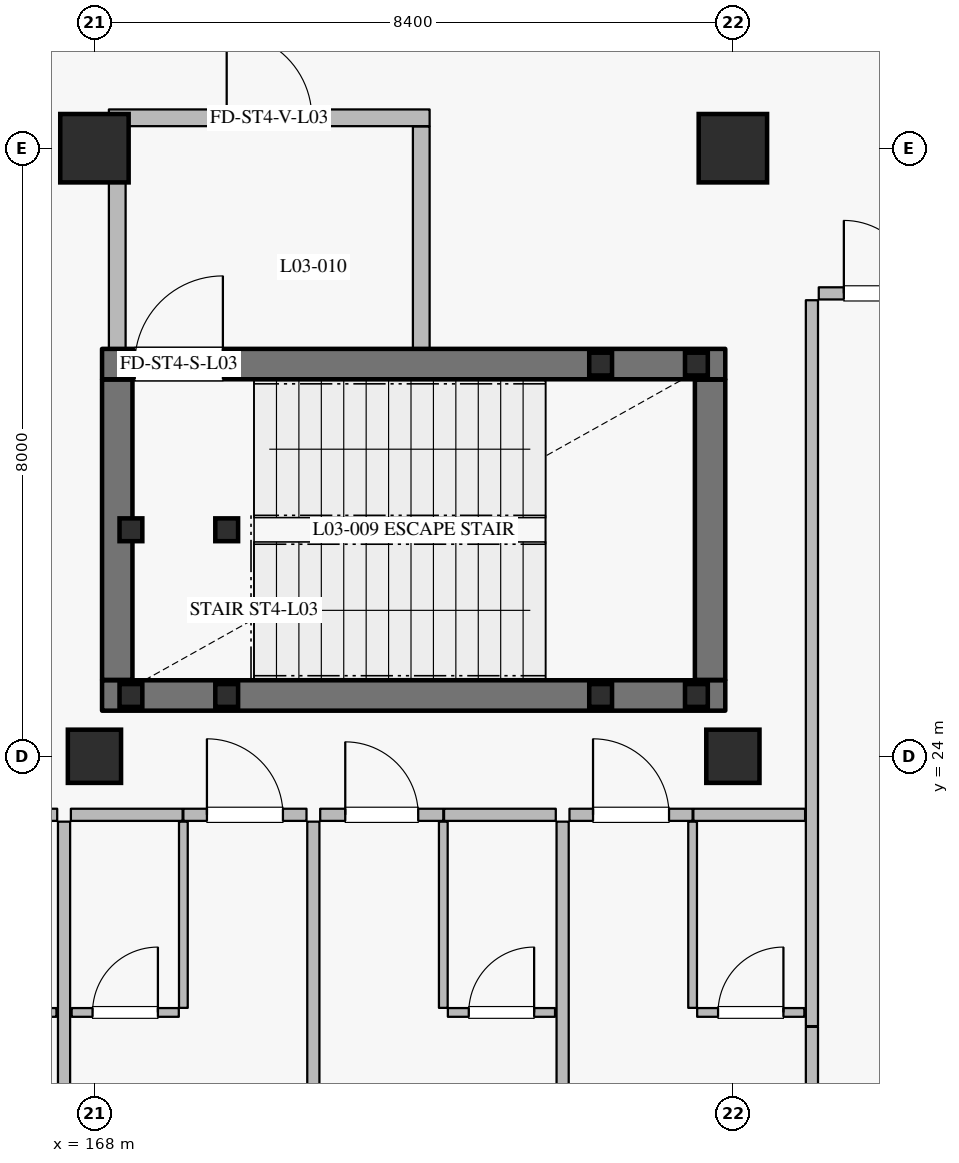
"""IFC4 building model, lengths in metres.
Left out: names, types, materials, properties, quantities, classifications, styles, units other than length and angle.
Written with IfcOpenShell. Run it as: python <this file> out.ifc"""

import sys

from ifc_helpers import new_model, si_unit, direction, frame, frame_2d, origin, origin_2d, place, context, subcontext, project, spatial, rectangle, hollow_rectangle, extrude, element, fill, save


model = new_model("IFC4")
c1 = context("Model", 3, precision=1e-05, world=origin(), true_north=direction((0.0, 1.0)))
c2 = subcontext(c1, "Body", "Model", "MODEL_VIEW")
j1 = project(units=[si_unit("LENGTHUNIT", "METRE"), si_unit("PLANEANGLEUNIT", "RADIAN")], contexts=[c1])
p1 = place(None, origin())
s1 = spatial("IfcSite", under=j1, at=p1, CompositionType="ELEMENT")
p2 = place(p1, origin())
s2 = spatial("IfcBuilding", under=s1, at=p2, CompositionType="ELEMENT")
p3 = place(p2, frame((0.0, 0.0, 16.2)))
s3 = spatial("IfcBuildingStorey", under=s2, at=p3, CompositionType="ELEMENT", Elevation=16.2)
for number, where, z_axis, x_axis in (
    (1, (168.0, 32.0, 0.0), (0.0, 0.0, 1.0), (1.0, 0.0, 0.0)),
    (2, (176.4, 32.0, 0.0), (0.0, 0.0, 1.0), (1.0, 0.0, 0.0)),
):
    element("IfcColumn", number, at=place(p3, frame(where, z_axis=z_axis, x_axis=x_axis)), inside=s3, PredefinedType="COLUMN", context=c2, shape_type="SweptSolid", body=[
        extrude(rectangle(XDim=0.9, YDim=0.9, at=origin_2d()), origin(), (0.0, 0.0, 1.0), 4.8),
    ])
for number, where, z_axis, x_axis in (
    (3, (168.0, 24.0, 0.0), (0.0, 0.0, 1.0), (1.0, 0.0, 0.0)),
    (4, (176.4, 24.0, 0.0), (0.0, 0.0, 1.0), (1.0, 0.0, 0.0)),
):
    element("IfcColumn", number, at=place(p3, frame(where, z_axis=z_axis, x_axis=x_axis)), inside=s3, PredefinedType="COLUMN", context=c2, shape_type="SweptSolid", body=[
        extrude(rectangle(XDim=0.7, YDim=0.7, at=origin_2d()), origin(), (0.0, 0.0, 1.0), 4.8),
    ])
p4 = place(p3, frame((184.4, 23.619, 0.0), z_axis=(0.0, 0.0, 1.0), x_axis=(-0.724145676014, -0.689647040094, 0.0)))
e5 = element("IfcWall", 5, at=p4, inside=s3, PredefinedType="SOLIDWALL", context=c2, shape_type="SweptSolid", body=[
    extrude(rectangle(XDim=10.495, YDim=0.24, at=frame_2d((5.248, 0.0))), origin(), (0.0, 0.0, 1.0), 4.13),
])
p5 = place(p4, frame((1.817, 0.0, 0.8)))
e6 = element("IfcOpeningElement", 6, at=p5, cuts=e5, PredefinedType="OPENING", context=c2, shape_type="SweptSolid", body=[
    extrude(rectangle(XDim=2.0, YDim=1.75, at=frame_2d((1.0, 0.875))), frame((0.0, 0.13, 0.0), z_axis=(0.0, -1.0, 0.0), x_axis=(1.0, 0.0, 0.0)), (0.0, 0.0, 1.0), 0.26),
])
p6 = place(p4, frame((6.347, 0.0, 0.8)))
e7 = element("IfcOpeningElement", 7, at=p6, cuts=e5, PredefinedType="OPENING", context=c2, shape_type="SweptSolid", body=[
    extrude(rectangle(XDim=2.0, YDim=1.75, at=frame_2d((1.0, 0.875))), frame((0.0, 0.13, 0.0), z_axis=(0.0, -1.0, 0.0), x_axis=(1.0, 0.0, 0.0)), (0.0, 0.0, 1.0), 0.26),
])
p7 = place(p3, frame((168.1, 24.8, 0.0), z_axis=(0.0, 0.0, 1.0), x_axis=(1.0, 0.0, 0.0)))
e8 = element("IfcWall", 8, at=p7, inside=s3, PredefinedType="SHEAR", context=c2, shape_type="SweptSolid", body=[
    extrude(rectangle(XDim=8.2, YDim=0.4, at=frame_2d((4.1, 0.0))), origin(), (0.0, 0.0, 1.0), 4.535),
])
p8 = place(p3, frame((176.1, 25.005, 0.0), z_axis=(0.0, 0.0, 1.0), x_axis=(0.0, 1.0, 0.0)))
e9 = element("IfcWall", 9, at=p8, inside=s3, PredefinedType="SHEAR", context=c2, shape_type="SweptSolid", body=[
    extrude(rectangle(XDim=3.95, YDim=0.4, at=frame_2d((1.975, 0.0))), origin(), (0.0, 0.0, 1.0), 4.535),
])
p9 = place(p3, frame((168.1, 29.16, 0.0), z_axis=(0.0, 0.0, 1.0), x_axis=(1.0, 0.0, 0.0)))
e10 = element("IfcWall", 10, at=p9, inside=s3, PredefinedType="SHEAR", context=c2, shape_type="SweptSolid", body=[
    extrude(rectangle(XDim=8.2, YDim=0.4, at=frame_2d((4.1, 0.0))), origin(), (0.0, 0.0, 1.0), 4.535),
])
p10 = place(p9, frame((0.43, 0.0, 0.0)))
e11 = element("IfcOpeningElement", 11, at=p10, cuts=e10, PredefinedType="OPENING", context=c2, shape_type="SweptSolid", body=[
    extrude(rectangle(XDim=1.16, YDim=2.2, at=frame_2d((0.58, 1.1))), frame((0.0, 0.21, 0.0), z_axis=(0.0, -1.0, 0.0), x_axis=(1.0, 0.0, 0.0)), (0.0, 0.0, 1.0), 0.42),
])
p11 = place(p3, frame((168.3, 25.005, 0.0), z_axis=(0.0, 0.0, 1.0), x_axis=(0.0, 1.0, 0.0)))
e12 = element("IfcWall", 12, at=p11, inside=s3, PredefinedType="SHEAR", context=c2, shape_type="SweptSolid", body=[
    extrude(rectangle(XDim=3.95, YDim=0.4, at=frame_2d((1.975, 0.0))), origin(), (0.0, 0.0, 1.0), 4.535),
])
p12 = place(p3, frame((168.3, 29.365, 0.0), z_axis=(0.0, 0.0, 1.0), x_axis=(0.0, 1.0, 0.0)))
e13 = element("IfcWall", 13, at=p12, inside=s3, PredefinedType="PARTITIONING", context=c2, shape_type="SweptSolid", body=[
    extrude(rectangle(XDim=2.92, YDim=0.22, at=frame_2d((1.46, 0.0))), origin(), (0.0, 0.0, 1.0), 4.535),
])
p13 = place(p3, frame((168.19, 32.4, 0.0), z_axis=(0.0, 0.0, 1.0), x_axis=(1.0, 0.0, 0.0)))
e14 = element("IfcWall", 14, at=p13, inside=s3, PredefinedType="PARTITIONING", context=c2, shape_type="SweptSolid", body=[
    extrude(rectangle(XDim=4.22, YDim=0.22, at=frame_2d((2.11, 0.0))), origin(), (0.0, 0.0, 1.0), 4.535),
])
p14 = place(p13, frame((1.55, 0.0, 0.0)))
e15 = element("IfcOpeningElement", 15, at=p14, cuts=e14, PredefinedType="OPENING", context=c2, shape_type="SweptSolid", body=[
    extrude(rectangle(XDim=1.12, YDim=2.2, at=frame_2d((0.56, 1.1))), frame((0.0, 0.12, 0.0), z_axis=(0.0, -1.0, 0.0), x_axis=(1.0, 0.0, 0.0)), (0.0, 0.0, 1.0), 0.24),
])
p15 = place(p3, frame((172.3, 29.365, 0.0), z_axis=(0.0, 0.0, 1.0), x_axis=(0.0, 1.0, 0.0)))
e16 = element("IfcWall", 16, at=p15, inside=s3, PredefinedType="PARTITIONING", context=c2, shape_type="SweptSolid", body=[
    extrude(rectangle(XDim=2.92, YDim=0.22, at=frame_2d((1.46, 0.0))), origin(), (0.0, 0.0, 1.0), 4.535),
])
for number, where, z_axis, x_axis in (
    (17, (168.48, 24.8, 0.0), (0.0, 0.0, 1.0), (1.0, 0.0, 0.0)),
    (18, (168.48, 26.98, 0.0), (0.0, 0.0, 1.0), (1.0, 0.0, 0.0)),
    (19, (169.74, 24.8, 0.0), (0.0, 0.0, 1.0), (1.0, 0.0, 0.0)),
    (20, (169.74, 26.98, 0.0), (0.0, 0.0, 1.0), (1.0, 0.0, 0.0)),
):
    element("IfcColumn", number, at=place(p3, frame(where, z_axis=z_axis, x_axis=x_axis)), inside=s3, PredefinedType="COLUMN", context=c2, shape_type="SweptSolid", body=[
        extrude(hollow_rectangle(XDim=0.3, YDim=0.3, WallThickness=0.012, at=origin_2d()), origin(), (0.0, 0.0, 1.0), 4.62),
    ])
for number, where, z_axis, x_axis in (
    (21, (174.66, 24.8, -2.4), (0.0, 0.0, 1.0), (1.0, 0.0, 0.0)),
    (22, (174.66, 29.16, -2.4), (0.0, 0.0, 1.0), (1.0, 0.0, 0.0)),
    (23, (175.92, 24.8, -2.4), (0.0, 0.0, 1.0), (1.0, 0.0, 0.0)),
    (24, (175.92, 29.16, -2.4), (0.0, 0.0, 1.0), (1.0, 0.0, 0.0)),
):
    element("IfcColumn", number, at=place(p3, frame(where, z_axis=z_axis, x_axis=x_axis)), inside=s3, PredefinedType="COLUMN", context=c2, shape_type="SweptSolid", body=[
        extrude(hollow_rectangle(XDim=0.3, YDim=0.3, WallThickness=0.012, at=origin_2d()), origin(), (0.0, 0.0, 1.0), 4.62),
    ])
p16 = place(p3, frame((166.04, 23.23, 0.0), z_axis=(0.0, 0.0, 1.0), x_axis=(1.0, 0.0, 0.0)))
e25 = element("IfcWall", 25, at=p16, inside=s3, PredefinedType="PARTITIONING", context=c2, shape_type="SweptSolid", body=[
    extrude(rectangle(XDim=1.47, YDim=0.16, at=frame_2d((0.735, 0.0))), origin(), (0.0, 0.0, 1.0), 4.535),
])
p17 = place(p3, frame((166.09, 20.63, 0.0), z_axis=(0.0, 0.0, 1.0), x_axis=(1.0, 0.0, 0.0)))
e26 = element("IfcWall", 26, at=p17, inside=s3, PredefinedType="PARTITIONING", context=c2, shape_type="SweptSolid", body=[
    extrude(rectangle(XDim=1.41, YDim=0.115, at=frame_2d((0.705, 0.0))), origin(), (0.0, 0.0, 1.0), 4.535),
])
p18 = place(p17, frame((0.275, 0.0, 0.0)))
e27 = element("IfcOpeningElement", 27, at=p18, cuts=e26, PredefinedType="OPENING", context=c2, shape_type="SweptSolid", body=[
    extrude(rectangle(XDim=0.86, YDim=2.12, at=frame_2d((0.43, 1.06))), frame((0.0, 0.067, 0.0), z_axis=(0.0, -1.0, 0.0), x_axis=(1.0, 0.0, 0.0)), (0.0, 0.0, 1.0), 0.135),
])
p19 = place(p3, frame((167.69, 23.23, 0.0), z_axis=(0.0, 0.0, 1.0), x_axis=(1.0, 0.0, 0.0)))
e28 = element("IfcWall", 28, at=p19, inside=s3, PredefinedType="PARTITIONING", context=c2, shape_type="SweptSolid", body=[
    extrude(rectangle(XDim=1.47, YDim=0.16, at=frame_2d((0.735, 0.0))), origin(), (0.0, 0.0, 1.0), 4.535),
])
p20 = place(p3, frame((169.17, 23.23, 0.0), z_axis=(0.0, 0.0, 1.0), x_axis=(1.0, 0.0, 0.0)))
e29 = element("IfcWall", 29, at=p20, inside=s3, PredefinedType="PARTITIONING", context=c2, shape_type="SweptSolid", body=[
    extrude(rectangle(XDim=1.62, YDim=0.16, at=frame_2d((0.81, 0.0))), origin(), (0.0, 0.0, 1.0), 4.535),
])
p21 = place(p20, frame((0.31, 0.0, 0.0)))
e30 = element("IfcOpeningElement", 30, at=p21, cuts=e29, PredefinedType="OPENING", context=c2, shape_type="SweptSolid", body=[
    extrude(rectangle(XDim=1.0, YDim=2.25, at=frame_2d((0.5, 1.125))), frame((0.0, 0.09, 0.0), z_axis=(0.0, -1.0, 0.0), x_axis=(1.0, 0.0, 0.0)), (0.0, 0.0, 1.0), 0.18),
])
p22 = place(p3, frame((169.17, 20.69, 0.0), z_axis=(0.0, 0.0, 1.0), x_axis=(0.0, 1.0, 0.0)))
e31 = element("IfcWall", 31, at=p22, inside=s3, PredefinedType="PARTITIONING", context=c2, shape_type="SweptSolid", body=[
    extrude(rectangle(XDim=2.45, YDim=0.115, at=frame_2d((1.225, 0.0))), origin(), (0.0, 0.0, 1.0), 4.535),
])
p23 = place(p3, frame((167.7, 20.63, 0.0), z_axis=(0.0, 0.0, 1.0), x_axis=(1.0, 0.0, 0.0)))
e32 = element("IfcWall", 32, at=p23, inside=s3, PredefinedType="PARTITIONING", context=c2, shape_type="SweptSolid", body=[
    extrude(rectangle(XDim=1.41, YDim=0.115, at=frame_2d((0.705, 0.0))), origin(), (0.0, 0.0, 1.0), 4.535),
])
p24 = place(p23, frame((0.275, 0.0, 0.0)))
e33 = element("IfcOpeningElement", 33, at=p24, cuts=e32, PredefinedType="OPENING", context=c2, shape_type="SweptSolid", body=[
    extrude(rectangle(XDim=0.86, YDim=2.12, at=frame_2d((0.43, 1.06))), frame((0.0, 0.067, 0.0), z_axis=(0.0, -1.0, 0.0), x_axis=(1.0, 0.0, 0.0)), (0.0, 0.0, 1.0), 0.135),
])
p25 = place(p3, frame((167.6, 16.34, 0.0), z_axis=(0.0, 0.0, 1.0), x_axis=(0.0, 1.0, 0.0)))
e34 = element("IfcWall", 34, at=p25, inside=s3, PredefinedType="PARTITIONING", context=c2, shape_type="SweptSolid", body=[
    extrude(rectangle(XDim=6.8, YDim=0.16, at=frame_2d((3.4, 0.0))), origin(), (0.0, 0.0, 1.0), 4.535),
])
p26 = place(p3, frame((170.97, 23.23, 0.0), z_axis=(0.0, 0.0, 1.0), x_axis=(1.0, 0.0, 0.0)))
e35 = element("IfcWall", 35, at=p26, inside=s3, PredefinedType="PARTITIONING", context=c2, shape_type="SweptSolid", body=[
    extrude(rectangle(XDim=1.62, YDim=0.16, at=frame_2d((0.81, 0.0))), origin(), (0.0, 0.0, 1.0), 4.535),
])
p27 = place(p26, frame((0.33, 0.0, 0.0)))
e36 = element("IfcOpeningElement", 36, at=p27, cuts=e35, PredefinedType="OPENING", context=c2, shape_type="SweptSolid", body=[
    extrude(rectangle(XDim=0.96, YDim=2.2, at=frame_2d((0.48, 1.1))), frame((0.0, 0.09, 0.0), z_axis=(0.0, -1.0, 0.0), x_axis=(1.0, 0.0, 0.0)), (0.0, 0.0, 1.0), 0.18),
])
p28 = place(p3, frame((172.6, 23.23, 0.0), z_axis=(0.0, 0.0, 1.0), x_axis=(1.0, 0.0, 0.0)))
e37 = element("IfcWall", 37, at=p28, inside=s3, PredefinedType="PARTITIONING", context=c2, shape_type="SweptSolid", body=[
    extrude(rectangle(XDim=1.47, YDim=0.16, at=frame_2d((0.735, 0.0))), origin(), (0.0, 0.0, 1.0), 4.535),
])
p29 = place(p3, frame((172.59, 20.69, 0.0), z_axis=(0.0, 0.0, 1.0), x_axis=(0.0, 1.0, 0.0)))
e38 = element("IfcWall", 38, at=p29, inside=s3, PredefinedType="PARTITIONING", context=c2, shape_type="SweptSolid", body=[
    extrude(rectangle(XDim=2.45, YDim=0.115, at=frame_2d((1.225, 0.0))), origin(), (0.0, 0.0, 1.0), 4.535),
])
p30 = place(p3, frame((172.65, 20.63, 0.0), z_axis=(0.0, 0.0, 1.0), x_axis=(1.0, 0.0, 0.0)))
e39 = element("IfcWall", 39, at=p30, inside=s3, PredefinedType="PARTITIONING", context=c2, shape_type="SweptSolid", body=[
    extrude(rectangle(XDim=1.41, YDim=0.115, at=frame_2d((0.705, 0.0))), origin(), (0.0, 0.0, 1.0), 4.535),
])
p31 = place(p30, frame((0.275, 0.0, 0.0)))
e40 = element("IfcOpeningElement", 40, at=p31, cuts=e39, PredefinedType="OPENING", context=c2, shape_type="SweptSolid", body=[
    extrude(rectangle(XDim=0.86, YDim=2.12, at=frame_2d((0.43, 1.06))), frame((0.0, 0.067, 0.0), z_axis=(0.0, -1.0, 0.0), x_axis=(1.0, 0.0, 0.0)), (0.0, 0.0, 1.0), 0.135),
])
p32 = place(p3, frame((170.88, 16.34, 0.0), z_axis=(0.0, 0.0, 1.0), x_axis=(0.0, 1.0, 0.0)))
e41 = element("IfcWall", 41, at=p32, inside=s3, PredefinedType="PARTITIONING", context=c2, shape_type="SweptSolid", body=[
    extrude(rectangle(XDim=6.8, YDim=0.16, at=frame_2d((3.4, 0.0))), origin(), (0.0, 0.0, 1.0), 4.535),
])
p33 = place(p3, frame((174.25, 23.23, 0.0), z_axis=(0.0, 0.0, 1.0), x_axis=(1.0, 0.0, 0.0)))
e42 = element("IfcWall", 42, at=p33, inside=s3, PredefinedType="PARTITIONING", context=c2, shape_type="SweptSolid", body=[
    extrude(rectangle(XDim=1.62, YDim=0.16, at=frame_2d((0.81, 0.0))), origin(), (0.0, 0.0, 1.0), 4.535),
])
p34 = place(p33, frame((0.31, 0.0, 0.0)))
e43 = element("IfcOpeningElement", 43, at=p34, cuts=e42, PredefinedType="OPENING", context=c2, shape_type="SweptSolid", body=[
    extrude(rectangle(XDim=1.0, YDim=2.25, at=frame_2d((0.5, 1.125))), frame((0.0, 0.09, 0.0), z_axis=(0.0, -1.0, 0.0), x_axis=(1.0, 0.0, 0.0)), (0.0, 0.0, 1.0), 0.18),
])
p35 = place(p3, frame((175.88, 23.23, 0.0), z_axis=(0.0, 0.0, 1.0), x_axis=(1.0, 0.0, 0.0)))
e44 = element("IfcWall", 44, at=p35, inside=s3, PredefinedType="PARTITIONING", context=c2, shape_type="SweptSolid", body=[
    extrude(rectangle(XDim=1.47, YDim=0.16, at=frame_2d((0.735, 0.0))), origin(), (0.0, 0.0, 1.0), 4.535),
])
p36 = place(p3, frame((175.87, 20.69, 0.0), z_axis=(0.0, 0.0, 1.0), x_axis=(0.0, 1.0, 0.0)))
e45 = element("IfcWall", 45, at=p36, inside=s3, PredefinedType="PARTITIONING", context=c2, shape_type="SweptSolid", body=[
    extrude(rectangle(XDim=2.45, YDim=0.115, at=frame_2d((1.225, 0.0))), origin(), (0.0, 0.0, 1.0), 4.535),
])
p37 = place(p3, frame((175.93, 20.63, 0.0), z_axis=(0.0, 0.0, 1.0), x_axis=(1.0, 0.0, 0.0)))
e46 = element("IfcWall", 46, at=p37, inside=s3, PredefinedType="PARTITIONING", context=c2, shape_type="SweptSolid", body=[
    extrude(rectangle(XDim=1.41, YDim=0.115, at=frame_2d((0.705, 0.0))), origin(), (0.0, 0.0, 1.0), 4.535),
])
p38 = place(p37, frame((0.275, 0.0, 0.0)))
e47 = element("IfcOpeningElement", 47, at=p38, cuts=e46, PredefinedType="OPENING", context=c2, shape_type="SweptSolid", body=[
    extrude(rectangle(XDim=0.86, YDim=2.12, at=frame_2d((0.43, 1.06))), frame((0.0, 0.067, 0.0), z_axis=(0.0, -1.0, 0.0), x_axis=(1.0, 0.0, 0.0)), (0.0, 0.0, 1.0), 0.135),
])
p39 = place(p3, frame((174.16, 17.33, 0.0), z_axis=(0.0, 0.0, 1.0), x_axis=(0.0, 1.0, 0.0)))
e48 = element("IfcWall", 48, at=p39, inside=s3, PredefinedType="PARTITIONING", context=c2, shape_type="SweptSolid", body=[
    extrude(rectangle(XDim=5.81, YDim=0.16, at=frame_2d((2.905, 0.0))), origin(), (0.0, 0.0, 1.0), 4.535),
])
p40 = place(p3, frame((177.44, 17.33, 0.0), z_axis=(0.0, 0.0, 1.0), x_axis=(0.0, 1.0, 0.0)))
e49 = element("IfcWall", 49, at=p40, inside=s3, PredefinedType="PARTITIONING", context=c2, shape_type="SweptSolid", body=[
    extrude(rectangle(XDim=3.11, YDim=0.16, at=frame_2d((1.555, 0.0))), origin(), (0.0, 0.0, 1.0), 4.535),
])
p41 = place(p3, frame((177.53, 30.09, 0.0), z_axis=(0.0, 0.0, 1.0), x_axis=(1.0, 0.0, 0.0)))
e50 = element("IfcWall", 50, at=p41, inside=s3, PredefinedType="PARTITIONING", context=c2, shape_type="SweptSolid", body=[
    extrude(rectangle(XDim=1.62, YDim=0.16, at=frame_2d((0.81, 0.0))), origin(), (0.0, 0.0, 1.0), 4.535),
])
p42 = place(p41, frame((0.33, 0.0, 0.0)))
e51 = element("IfcOpeningElement", 51, at=p42, cuts=e50, PredefinedType="OPENING", context=c2, shape_type="SweptSolid", body=[
    extrude(rectangle(XDim=0.96, YDim=2.2, at=frame_2d((0.48, 1.1))), frame((0.0, 0.09, 0.0), z_axis=(0.0, -1.0, 0.0), x_axis=(1.0, 0.0, 0.0)), (0.0, 0.0, 1.0), 0.18),
])
p43 = place(p3, frame((177.44, 20.45, 0.0), z_axis=(0.0, 0.0, 1.0), x_axis=(0.0, 1.0, 0.0)))
e52 = element("IfcWall", 52, at=p43, inside=s3, PredefinedType="PARTITIONING", context=c2, shape_type="SweptSolid", body=[
    extrude(rectangle(XDim=9.55, YDim=0.16, at=frame_2d((4.775, 0.0))), origin(), (0.0, 0.0, 1.0), 4.535),
])
p44 = place(p10, origin())
e53 = element("IfcDoor", 53, at=p44, inside=s3, OperationType="SINGLE_SWING_RIGHT", PredefinedType="DOOR", context=c2, shape_type="SweptSolid", body=[
    extrude(rectangle(XDim=1.16, YDim=2.2, at=frame_2d((0.58, 1.1))), frame((0.0, 0.025, 0.0), z_axis=(0.0, -1.0, 0.0), x_axis=(1.0, 0.0, 0.0)), (0.0, 0.0, 1.0), 0.05),
])
fill(e11, e53)
p45 = place(p14, origin())
e54 = element("IfcDoor", 54, at=p45, inside=s3, OperationType="SINGLE_SWING_LEFT", PredefinedType="DOOR", context=c2, shape_type="SweptSolid", body=[
    extrude(rectangle(XDim=1.12, YDim=2.2, at=frame_2d((0.56, 1.1))), frame((0.0, 0.025, 0.0), z_axis=(0.0, -1.0, 0.0), x_axis=(1.0, 0.0, 0.0)), (0.0, 0.0, 1.0), 0.05),
])
fill(e15, e54)
p46 = place(p21, origin())
e55 = element("IfcDoor", 55, at=p46, inside=s3, OperationType="SINGLE_SWING_LEFT", PredefinedType="DOOR", context=c2, shape_type="SweptSolid", body=[
    extrude(rectangle(XDim=1.0, YDim=2.25, at=frame_2d((0.5, 1.125))), frame((0.0, 0.025, 0.0), z_axis=(0.0, -1.0, 0.0), x_axis=(1.0, 0.0, 0.0)), (0.0, 0.0, 1.0), 0.05),
])
fill(e30, e55)
p47 = place(p24, origin())
e56 = element("IfcDoor", 56, at=p47, inside=s3, OperationType="SINGLE_SWING_RIGHT", PredefinedType="DOOR", context=c2, shape_type="SweptSolid", body=[
    extrude(rectangle(XDim=0.86, YDim=2.12, at=frame_2d((0.43, 1.06))), frame((0.0, 0.025, 0.0), z_axis=(0.0, -1.0, 0.0), x_axis=(1.0, 0.0, 0.0)), (0.0, 0.0, 1.0), 0.05),
])
fill(e33, e56)
p48 = place(p27, origin())
e57 = element("IfcDoor", 57, at=p48, inside=s3, OperationType="SINGLE_SWING_LEFT", PredefinedType="DOOR", context=c2, shape_type="SweptSolid", body=[
    extrude(rectangle(XDim=0.96, YDim=2.2, at=frame_2d((0.48, 1.1))), frame((0.0, 0.025, 0.0), z_axis=(0.0, -1.0, 0.0), x_axis=(1.0, 0.0, 0.0)), (0.0, 0.0, 1.0), 0.05),
])
fill(e36, e57)
p49 = place(p31, origin())
e58 = element("IfcDoor", 58, at=p49, inside=s3, OperationType="SINGLE_SWING_RIGHT", PredefinedType="DOOR", context=c2, shape_type="SweptSolid", body=[
    extrude(rectangle(XDim=0.86, YDim=2.12, at=frame_2d((0.43, 1.06))), frame((0.0, 0.025, 0.0), z_axis=(0.0, -1.0, 0.0), x_axis=(1.0, 0.0, 0.0)), (0.0, 0.0, 1.0), 0.05),
])
fill(e40, e58)
p50 = place(p34, origin())
e59 = element("IfcDoor", 59, at=p50, inside=s3, OperationType="SINGLE_SWING_LEFT", PredefinedType="DOOR", context=c2, shape_type="SweptSolid", body=[
    extrude(rectangle(XDim=1.0, YDim=2.25, at=frame_2d((0.5, 1.125))), frame((0.0, 0.025, 0.0), z_axis=(0.0, -1.0, 0.0), x_axis=(1.0, 0.0, 0.0)), (0.0, 0.0, 1.0), 0.05),
])
fill(e43, e59)
p51 = place(p38, origin())
e60 = element("IfcDoor", 60, at=p51, inside=s3, OperationType="SINGLE_SWING_RIGHT", PredefinedType="DOOR", context=c2, shape_type="SweptSolid", body=[
    extrude(rectangle(XDim=0.86, YDim=2.12, at=frame_2d((0.43, 1.06))), frame((0.0, 0.025, 0.0), z_axis=(0.0, -1.0, 0.0), x_axis=(1.0, 0.0, 0.0)), (0.0, 0.0, 1.0), 0.05),
])
fill(e47, e60)
p52 = place(p42, origin())
e61 = element("IfcDoor", 61, at=p52, inside=s3, OperationType="SINGLE_SWING_LEFT", PredefinedType="DOOR", context=c2, shape_type="SweptSolid", body=[
    extrude(rectangle(XDim=0.96, YDim=2.2, at=frame_2d((0.48, 1.1))), frame((0.0, 0.025, 0.0), z_axis=(0.0, -1.0, 0.0), x_axis=(1.0, 0.0, 0.0)), (0.0, 0.0, 1.0), 0.05),
])
fill(e51, e61)
save(model, sys.argv[1])
